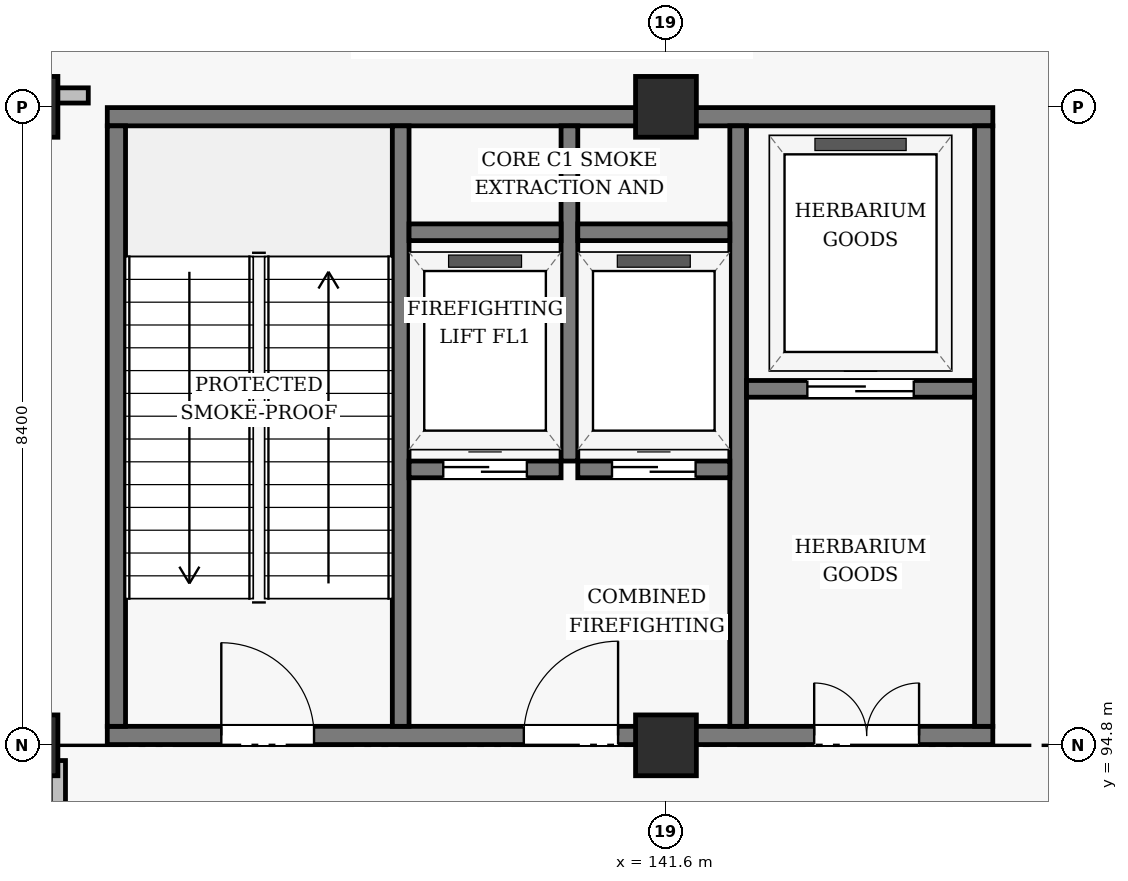
"""IFC4 building model, lengths in metres.
Left out: names, types, materials, properties, quantities, classifications, styles, units other than length and angle.
Written with IfcOpenShell. Run it as: python <this file> out.ifc"""

import sys

from ifc_helpers import new_model, si_unit, direction, frame, frame_2d, origin, origin_2d, place, context, subcontext, project, spatial, rectangle, extrude, element, fill, save


model = new_model("IFC4")
c1 = context("Model", 3, precision=1e-05, world=origin(), true_north=direction((0.0, 1.0)))
c2 = subcontext(c1, "Body", "Model", "MODEL_VIEW")
j1 = project(units=[si_unit("LENGTHUNIT", "METRE"), si_unit("PLANEANGLEUNIT", "RADIAN")], contexts=[c1])
p1 = place(None, origin())
s1 = spatial("IfcSite", under=j1, at=p1, CompositionType="ELEMENT")
p2 = place(p1, origin())
s2 = spatial("IfcBuilding", under=s1, at=p2, CompositionType="ELEMENT")
p3 = place(p2, frame((0.0, 0.0, -4.8)))
s3 = spatial("IfcBuildingStorey", under=s2, at=p3, CompositionType="ELEMENT", Elevation=-4.8)
for number, where, z_axis, x_axis in (
    (1, (133.2, 94.8, 0.0), (0.0, 0.0, 1.0), (1.0, 0.0, 0.0)),
    (2, (133.2, 103.2, 0.0), (0.0, 0.0, 1.0), (1.0, 0.0, 0.0)),
    (3, (141.6, 94.8, 0.0), (0.0, 0.0, 1.0), (1.0, 0.0, 0.0)),
    (4, (141.6, 103.2, 0.0), (0.0, 0.0, 1.0), (1.0, 0.0, 0.0)),
):
    element("IfcColumn", number, at=place(p3, frame(where, z_axis=z_axis, x_axis=x_axis)), inside=s3, PredefinedType="COLUMN", context=c2, shape_type="SweptSolid", body=[
        extrude(rectangle(XDim=0.8, YDim=0.8, at=origin_2d()), origin(), (0.0, 0.0, 1.0), 4.8),
    ])
p4 = place(p3, frame((134.25, 94.93, 0.0), z_axis=(0.0, 0.0, 1.0), x_axis=(1.0, 0.0, 0.0)))
e5 = element("IfcWall", 5, at=p4, inside=s3, PredefinedType="SHEAR", context=c2, shape_type="SweptSolid", body=[
    extrude(rectangle(XDim=11.65, YDim=0.24, at=frame_2d((5.825, 0.0))), origin(), (0.0, 0.0, 1.0), 4.54),
])
p5 = place(p4, frame((1.5, 0.0, 0.0)))
e6 = element("IfcOpeningElement", 6, at=p5, cuts=e5, PredefinedType="OPENING", context=c2, shape_type="SweptSolid", body=[
    extrude(rectangle(XDim=1.22, YDim=2.18, at=frame_2d((0.61, 1.09))), frame((0.0, 0.13, 0.0), z_axis=(0.0, -1.0, 0.0), x_axis=(1.0, 0.0, 0.0)), (0.0, 0.0, 1.0), 0.26),
])
p6 = place(p4, frame((5.48, 0.0, 0.0)))
e7 = element("IfcOpeningElement", 7, at=p6, cuts=e5, PredefinedType="OPENING", context=c2, shape_type="SweptSolid", body=[
    extrude(rectangle(XDim=1.24, YDim=2.15, at=frame_2d((0.62, 1.075))), frame((0.0, 0.13, 0.0), z_axis=(0.0, -1.0, 0.0), x_axis=(1.0, 0.0, 0.0)), (0.0, 0.0, 1.0), 0.26),
])
p7 = place(p4, frame((9.3, 0.0, 0.0)))
e8 = element("IfcOpeningElement", 8, at=p7, cuts=e5, PredefinedType="OPENING", context=c2, shape_type="SweptSolid", body=[
    extrude(rectangle(XDim=1.38, YDim=2.15, at=frame_2d((0.69, 1.075))), frame((0.0, 0.13, 0.0), z_axis=(0.0, -1.0, 0.0), x_axis=(1.0, 0.0, 0.0)), (0.0, 0.0, 1.0), 0.26),
])
p8 = place(p3, frame((134.25, 103.07, 0.0), z_axis=(0.0, 0.0, 1.0), x_axis=(1.0, 0.0, 0.0)))
e9 = element("IfcWall", 9, at=p8, inside=s3, PredefinedType="SHEAR", context=c2, shape_type="SweptSolid", body=[
    extrude(rectangle(XDim=11.65, YDim=0.24, at=frame_2d((5.825, 0.0))), origin(), (0.0, 0.0, 1.0), 4.54),
])
p9 = place(p3, frame((134.37, 95.05, 0.0), z_axis=(0.0, 0.0, 1.0), x_axis=(0.0, 1.0, 0.0)))
e10 = element("IfcWall", 10, at=p9, inside=s3, PredefinedType="SHEAR", context=c2, shape_type="SweptSolid", body=[
    extrude(rectangle(XDim=7.9, YDim=0.24, at=frame_2d((3.95, 0.0))), origin(), (0.0, 0.0, 1.0), 4.54),
])
p10 = place(p3, frame((138.11, 95.05, 0.0), z_axis=(0.0, 0.0, 1.0), x_axis=(0.0, 1.0, 0.0)))
e11 = element("IfcWall", 11, at=p10, inside=s3, PredefinedType="SHEAR", context=c2, shape_type="SweptSolid", body=[
    extrude(rectangle(XDim=7.9, YDim=0.22, at=frame_2d((3.95, 0.0))), origin(), (0.0, 0.0, 1.0), 4.54),
])
p11 = place(p3, frame((140.33, 98.54, 0.0), z_axis=(0.0, 0.0, 1.0), x_axis=(0.0, 1.0, 0.0)))
e12 = element("IfcWall", 12, at=p11, inside=s3, PredefinedType="SHEAR", context=c2, shape_type="SweptSolid", body=[
    extrude(rectangle(XDim=4.41, YDim=0.22, at=frame_2d((2.205, 0.0))), origin(), (0.0, 0.0, 1.0), 4.54),
])
p12 = place(p3, frame((142.55, 95.05, 0.0), z_axis=(0.0, 0.0, 1.0), x_axis=(0.0, 1.0, 0.0)))
e13 = element("IfcWall", 13, at=p12, inside=s3, PredefinedType="SHEAR", context=c2, shape_type="SweptSolid", body=[
    extrude(rectangle(XDim=7.9, YDim=0.22, at=frame_2d((3.95, 0.0))), origin(), (0.0, 0.0, 1.0), 4.54),
])
p13 = place(p3, frame((145.78, 95.05, 0.0), z_axis=(0.0, 0.0, 1.0), x_axis=(0.0, 1.0, 0.0)))
e14 = element("IfcWall", 14, at=p13, inside=s3, PredefinedType="SHEAR", context=c2, shape_type="SweptSolid", body=[
    extrude(rectangle(XDim=7.9, YDim=0.24, at=frame_2d((3.95, 0.0))), origin(), (0.0, 0.0, 1.0), 4.54),
])
p14 = place(p3, frame((138.22, 98.43, 0.0), z_axis=(0.0, 0.0, 1.0), x_axis=(1.0, 0.0, 0.0)))
e15 = element("IfcWall", 15, at=p14, inside=s3, PredefinedType="SHEAR", context=c2, shape_type="SweptSolid", body=[
    extrude(rectangle(XDim=2.0, YDim=0.22, at=frame_2d((1.0, 0.0))), origin(), (0.0, 0.0, 1.0), 4.54),
])
p15 = place(p14, frame((0.45, 0.0, 0.0)))
e16 = element("IfcOpeningElement", 16, at=p15, cuts=e15, PredefinedType="OPENING", context=c2, shape_type="SweptSolid", body=[
    extrude(rectangle(XDim=1.1, YDim=2.15, at=frame_2d((0.55, 1.075))), frame((0.0, 0.12, 0.0), z_axis=(0.0, -1.0, 0.0), x_axis=(1.0, 0.0, 0.0)), (0.0, 0.0, 1.0), 0.24),
])
p16 = place(p3, frame((140.44, 98.43, 0.0), z_axis=(0.0, 0.0, 1.0), x_axis=(1.0, 0.0, 0.0)))
e17 = element("IfcWall", 17, at=p16, inside=s3, PredefinedType="SHEAR", context=c2, shape_type="SweptSolid", body=[
    extrude(rectangle(XDim=2.0, YDim=0.22, at=frame_2d((1.0, 0.0))), origin(), (0.0, 0.0, 1.0), 4.54),
])
p17 = place(p16, frame((0.45, 0.0, 0.0)))
e18 = element("IfcOpeningElement", 18, at=p17, cuts=e17, PredefinedType="OPENING", context=c2, shape_type="SweptSolid", body=[
    extrude(rectangle(XDim=1.1, YDim=2.15, at=frame_2d((0.55, 1.075))), frame((0.0, 0.12, 0.0), z_axis=(0.0, -1.0, 0.0), x_axis=(1.0, 0.0, 0.0)), (0.0, 0.0, 1.0), 0.24),
])
for number, where, z_axis, x_axis in (
    (19, (138.22, 101.55, 0.0), (0.0, 0.0, 1.0), (1.0, 0.0, 0.0)),
    (20, (140.44, 101.55, 0.0), (0.0, 0.0, 1.0), (1.0, 0.0, 0.0)),
):
    element("IfcWall", number, at=place(p3, frame(where, z_axis=z_axis, x_axis=x_axis)), inside=s3, PredefinedType="SHEAR", context=c2, shape_type="SweptSolid", body=[
        extrude(rectangle(XDim=2.0, YDim=0.22, at=frame_2d((1.0, 0.0))), origin(), (0.0, 0.0, 1.0), 4.54),
    ])
p18 = place(p3, frame((142.66, 99.49, 0.0), z_axis=(0.0, 0.0, 1.0), x_axis=(1.0, 0.0, 0.0)))
e21 = element("IfcWall", 21, at=p18, inside=s3, PredefinedType="SHEAR", context=c2, shape_type="SweptSolid", body=[
    extrude(rectangle(XDim=3.0, YDim=0.22, at=frame_2d((1.5, 0.0))), origin(), (0.0, 0.0, 1.0), 4.54),
])
p19 = place(p18, frame((0.8, 0.0, 0.0)))
e22 = element("IfcOpeningElement", 22, at=p19, cuts=e21, PredefinedType="OPENING", context=c2, shape_type="SweptSolid", body=[
    extrude(rectangle(XDim=1.4, YDim=2.2, at=frame_2d((0.7, 1.1))), frame((0.0, 0.12, 0.0), z_axis=(0.0, -1.0, 0.0), x_axis=(1.0, 0.0, 0.0)), (0.0, 0.0, 1.0), 0.24),
])
p20 = place(p3, frame((116.8, 103.35, 0.0), z_axis=(0.0, 0.0, 1.0), x_axis=(1.0, 0.0, 0.0)))
e23 = element("IfcWall", 23, at=p20, inside=s3, PredefinedType="SOLIDWALL", context=c2, shape_type="SweptSolid", body=[
    extrude(rectangle(XDim=17.2, YDim=0.2, at=frame_2d((8.6, 0.0))), origin(), (0.0, 0.0, 1.0), 3.79),
])
p21 = place(p20, frame((9.92, 0.0, 0.0)))
e24 = element("IfcOpeningElement", 24, at=p21, cuts=e23, PredefinedType="OPENING", context=c2, shape_type="SweptSolid", body=[
    extrude(rectangle(XDim=1.18, YDim=2.15, at=frame_2d((0.59, 1.075))), frame((0.0, 0.11, 0.0), z_axis=(0.0, -1.0, 0.0), x_axis=(1.0, 0.0, 0.0)), (0.0, 0.0, 1.0), 0.22),
])
p22 = place(p3, frame((133.6, 78.4, 0.0), z_axis=(0.0, 0.0, 1.0), x_axis=(0.0, 1.0, 0.0)))
e25 = element("IfcWall", 25, at=p22, inside=s3, PredefinedType="SOLIDWALL", context=c2, shape_type="SweptSolid", body=[
    extrude(rectangle(XDim=16.2, YDim=0.2, at=frame_2d((8.1, 0.0))), origin(), (0.0, 0.0, 1.0), 3.79),
])
p23 = place(p22, frame((5.586, 0.0, 0.0)))
e26 = element("IfcOpeningElement", 26, at=p23, cuts=e25, PredefinedType="OPENING", context=c2, shape_type="SweptSolid", body=[
    extrude(rectangle(XDim=1.48, YDim=2.22, at=frame_2d((0.74, 1.11))), frame((0.0, 0.11, 0.0), z_axis=(0.0, -1.0, 0.0), x_axis=(1.0, 0.0, 0.0)), (0.0, 0.0, 1.0), 0.22),
])
p24 = place(p5, origin())
e27 = element("IfcDoor", 27, at=p24, inside=s3, OperationType="SINGLE_SWING_LEFT", PredefinedType="DOOR", context=c2, shape_type="SweptSolid", body=[
    extrude(rectangle(XDim=1.22, YDim=2.18, at=frame_2d((0.61, 1.09))), frame((0.0, 0.025, 0.0), z_axis=(0.0, -1.0, 0.0), x_axis=(1.0, 0.0, 0.0)), (0.0, 0.0, 1.0), 0.05),
])
fill(e6, e27)
p25 = place(p6, frame((1.24, 0.0, 0.0), z_axis=(0.0, 0.0, 1.0), x_axis=(-1.0, 0.0, 0.0)))
e28 = element("IfcDoor", 28, at=p25, inside=s3, OperationType="SINGLE_SWING_RIGHT", PredefinedType="DOOR", context=c2, shape_type="SweptSolid", body=[
    extrude(rectangle(XDim=1.24, YDim=2.15, at=frame_2d((0.62, 1.075))), frame((0.0, 0.025, 0.0), z_axis=(0.0, -1.0, 0.0), x_axis=(1.0, 0.0, 0.0)), (0.0, 0.0, 1.0), 0.05),
])
fill(e7, e28)
p26 = place(p7, frame((1.38, 0.0, 0.0), z_axis=(0.0, 0.0, 1.0), x_axis=(-1.0, 0.0, 0.0)))
e29 = element("IfcDoor", 29, at=p26, inside=s3, OperationType="DOUBLE_DOOR_SINGLE_SWING", PredefinedType="DOOR", context=c2, shape_type="SweptSolid", body=[
    extrude(rectangle(XDim=1.38, YDim=2.15, at=frame_2d((0.69, 1.075))), frame((0.0, 0.025, 0.0), z_axis=(0.0, -1.0, 0.0), x_axis=(1.0, 0.0, 0.0)), (0.0, 0.0, 1.0), 0.05),
])
fill(e8, e29)
p27 = place(p15, origin())
e30 = element("IfcDoor", 30, at=p27, inside=s3, OperationType="SLIDING_TO_LEFT", PredefinedType="DOOR", context=c2, shape_type="SweptSolid", body=[
    extrude(rectangle(XDim=1.1, YDim=2.15, at=frame_2d((0.55, 1.075))), frame((0.0, 0.025, 0.0), z_axis=(0.0, -1.0, 0.0), x_axis=(1.0, 0.0, 0.0)), (0.0, 0.0, 1.0), 0.05),
])
fill(e16, e30)
p28 = place(p17, origin())
e31 = element("IfcDoor", 31, at=p28, inside=s3, OperationType="SLIDING_TO_LEFT", PredefinedType="DOOR", context=c2, shape_type="SweptSolid", body=[
    extrude(rectangle(XDim=1.1, YDim=2.15, at=frame_2d((0.55, 1.075))), frame((0.0, 0.025, 0.0), z_axis=(0.0, -1.0, 0.0), x_axis=(1.0, 0.0, 0.0)), (0.0, 0.0, 1.0), 0.05),
])
fill(e18, e31)
p29 = place(p19, origin())
e32 = element("IfcDoor", 32, at=p29, inside=s3, OperationType="SLIDING_TO_LEFT", PredefinedType="DOOR", context=c2, shape_type="SweptSolid", body=[
    extrude(rectangle(XDim=1.4, YDim=2.2, at=frame_2d((0.7, 1.1))), frame((0.0, 0.025, 0.0), z_axis=(0.0, -1.0, 0.0), x_axis=(1.0, 0.0, 0.0)), (0.0, 0.0, 1.0), 0.05),
])
fill(e22, e32)
save(model, sys.argv[1])
